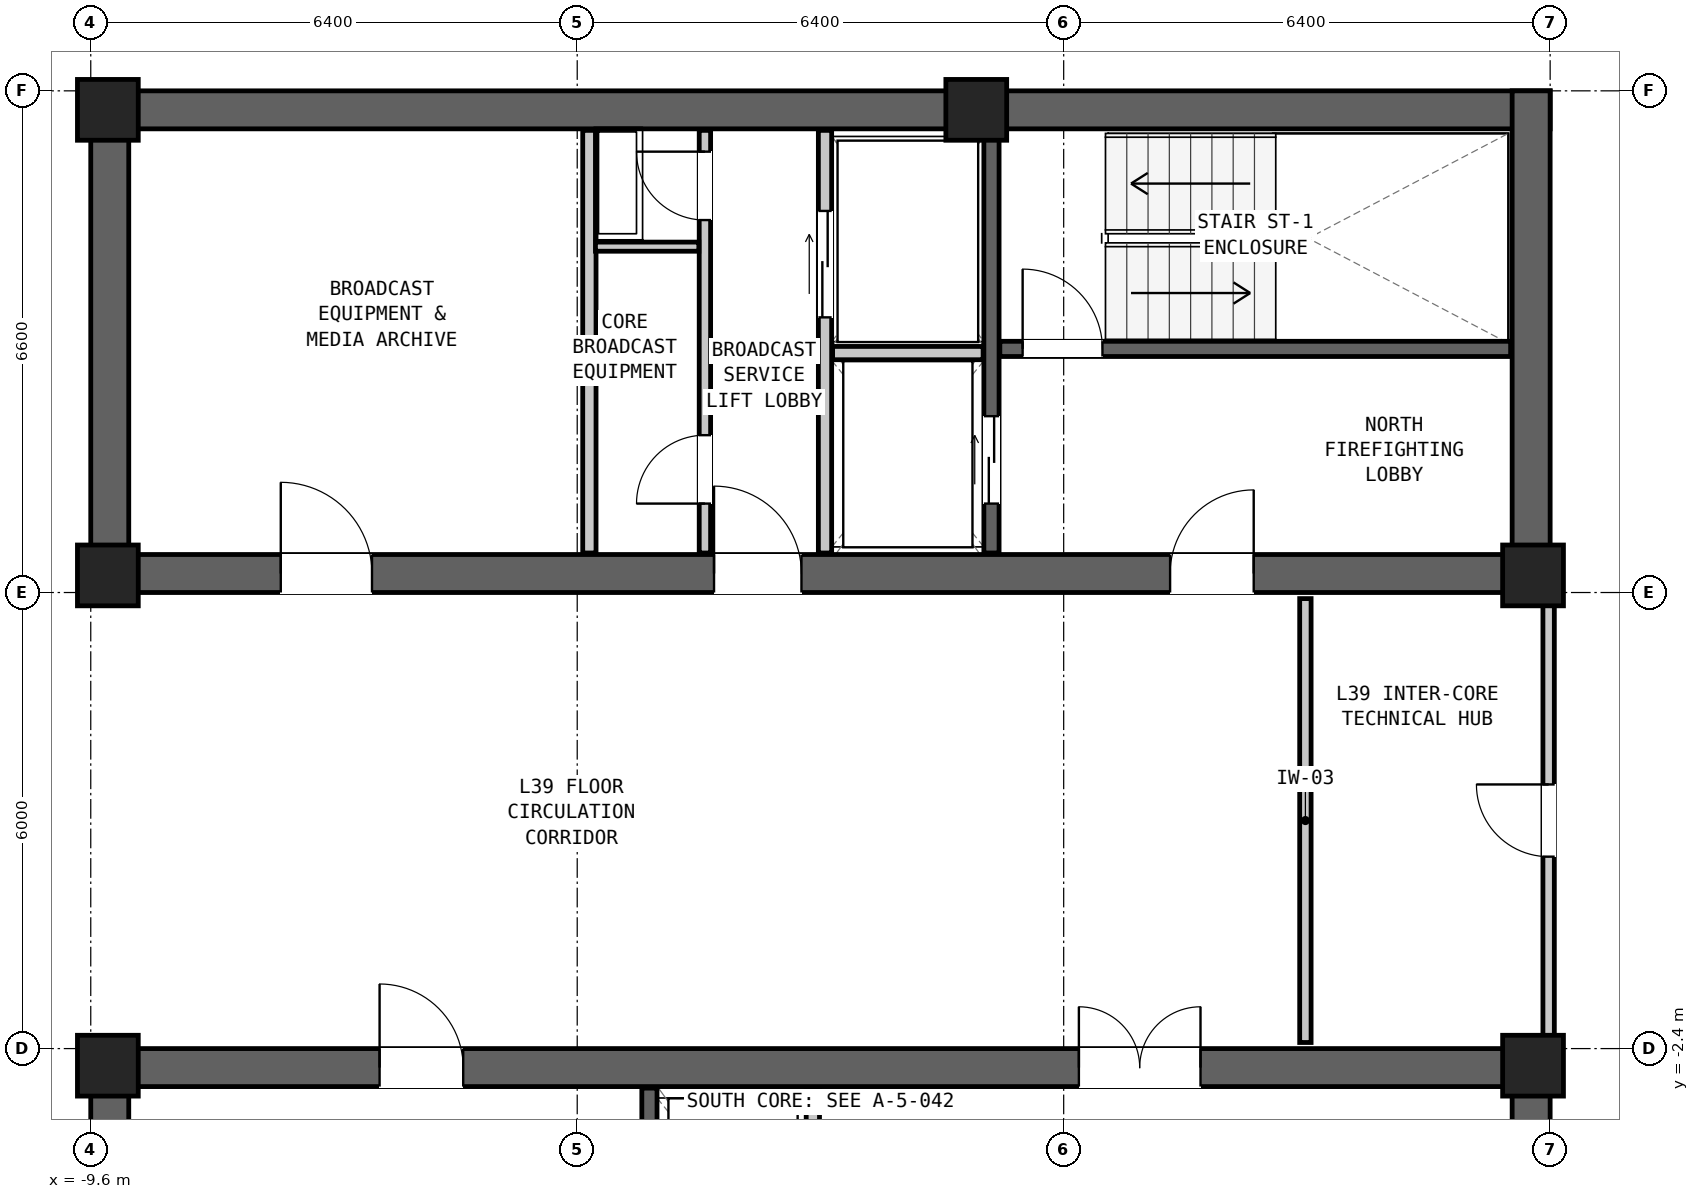
"""IFC4 building model, lengths in metres.
Left out: names, types, materials, properties, quantities, classifications, styles, units other than length and angle.
Written with IfcOpenShell. Run it as: python <this file> out.ifc"""

import sys

from ifc_helpers import new_model, si_unit, direction, frame, frame_2d, origin, origin_2d, place, context, subcontext, project, spatial, rectangle, extrude, element, fill, save


model = new_model("IFC4")
c1 = context("Model", 3, precision=1e-05, world=origin(), true_north=direction((0.0, 1.0)))
c2 = subcontext(c1, "Body", "Model", "MODEL_VIEW")
j1 = project(units=[si_unit("LENGTHUNIT", "METRE"), si_unit("PLANEANGLEUNIT", "RADIAN")], contexts=[c1])
p1 = place(None, origin())
s1 = spatial("IfcSite", under=j1, at=p1, CompositionType="ELEMENT")
p2 = place(p1, origin())
s2 = spatial("IfcBuilding", under=s1, at=p2, CompositionType="ELEMENT")
p3 = place(p2, frame((0.0, 0.0, 134.15)))
s3 = spatial("IfcBuildingStorey", under=s2, at=p3, CompositionType="ELEMENT", Elevation=134.15)
p4 = place(p3, frame((-9.6, 9.95, 0.0), z_axis=(0.0, 0.0, 1.0), x_axis=(1.0, 0.0, 0.0)))
e1 = element("IfcWall", 1, at=p4, inside=s3, PredefinedType="SHEAR", context=c2, shape_type="SweptSolid", body=[
    extrude(rectangle(XDim=19.2, YDim=0.5, at=frame_2d((9.6, 0.0))), origin(), (0.0, 0.0, 1.0), 3.05),
])
p5 = place(p3, frame((-9.6, 3.85, 0.0), z_axis=(0.0, 0.0, 1.0), x_axis=(1.0, 0.0, 0.0)))
e2 = element("IfcWall", 2, at=p5, inside=s3, PredefinedType="SHEAR", context=c2, shape_type="SweptSolid", body=[
    extrude(rectangle(XDim=19.2, YDim=0.5, at=frame_2d((9.6, 0.0))), origin(), (0.0, 0.0, 1.0), 3.05),
])
p6 = place(p5, frame((14.2, 0.0, 0.0)))
e3 = element("IfcOpeningElement", 3, at=p6, cuts=e2, PredefinedType="OPENING", context=c2, shape_type="SweptSolid", body=[
    extrude(rectangle(XDim=1.1, YDim=2.08, at=frame_2d((0.55, 1.04))), frame((0.0, 0.262, 0.0), z_axis=(0.0, -1.0, 0.0), x_axis=(1.0, 0.0, 0.0)), (0.0, 0.0, 1.0), 0.524),
])
p7 = place(p5, frame((8.2, 0.0, 0.0)))
e4 = element("IfcOpeningElement", 4, at=p7, cuts=e2, PredefinedType="OPENING", context=c2, shape_type="SweptSolid", body=[
    extrude(rectangle(XDim=1.15, YDim=2.1, at=frame_2d((0.575, 1.05))), frame((0.0, 0.262, 0.0), z_axis=(0.0, -1.0, 0.0), x_axis=(1.0, 0.0, 0.0)), (0.0, 0.0, 1.0), 0.524),
])
p8 = place(p5, frame((2.5, 0.0, 0.0)))
e5 = element("IfcOpeningElement", 5, at=p8, cuts=e2, PredefinedType="OPENING", context=c2, shape_type="SweptSolid", body=[
    extrude(rectangle(XDim=1.2, YDim=2.1, at=frame_2d((0.6, 1.05))), frame((0.0, 0.262, 0.0), z_axis=(0.0, -1.0, 0.0), x_axis=(1.0, 0.0, 0.0)), (0.0, 0.0, 1.0), 0.524),
])
for number, where, z_axis, x_axis in (
    (6, (-9.35, 3.6, 0.0), (0.0, 0.0, 1.0), (0.0, 1.0, 0.0)),
    (7, (9.35, 3.6, 0.0), (0.0, 0.0, 1.0), (0.0, 1.0, 0.0)),
):
    element("IfcWall", number, at=place(p3, frame(where, z_axis=z_axis, x_axis=x_axis)), inside=s3, PredefinedType="SHEAR", context=c2, shape_type="SweptSolid", body=[
        extrude(rectangle(XDim=6.6, YDim=0.5, at=frame_2d((3.3, 0.0))), origin(), (0.0, 0.0, 1.0), 3.05),
    ])
p9 = place(p3, frame((-9.6, -2.65, 0.0), z_axis=(0.0, 0.0, 1.0), x_axis=(1.0, 0.0, 0.0)))
e8 = element("IfcWall", 8, at=p9, inside=s3, PredefinedType="SHEAR", context=c2, shape_type="SweptSolid", body=[
    extrude(rectangle(XDim=19.2, YDim=0.5, at=frame_2d((9.6, 0.0))), origin(), (0.0, 0.0, 1.0), 3.05),
])
p10 = place(p9, frame((3.8, 0.0, 0.0)))
e9 = element("IfcOpeningElement", 9, at=p10, cuts=e8, PredefinedType="OPENING", context=c2, shape_type="SweptSolid", body=[
    extrude(rectangle(XDim=1.1, YDim=2.08, at=frame_2d((0.55, 1.04))), frame((0.0, 0.262, 0.0), z_axis=(0.0, -1.0, 0.0), x_axis=(1.0, 0.0, 0.0)), (0.0, 0.0, 1.0), 0.524),
])
p11 = place(p9, frame((13.0, 0.0, 0.0)))
e10 = element("IfcOpeningElement", 10, at=p11, cuts=e8, PredefinedType="OPENING", context=c2, shape_type="SweptSolid", body=[
    extrude(rectangle(XDim=1.6, YDim=2.12, at=frame_2d((0.8, 1.06))), frame((0.0, 0.262, 0.0), z_axis=(0.0, -1.0, 0.0), x_axis=(1.0, 0.0, 0.0)), (0.0, 0.0, 1.0), 0.524),
])
for number, where, z_axis, x_axis in (
    (11, (-9.35, -9.0, 0.0), (0.0, 0.0, 1.0), (0.0, 1.0, 0.0)),
    (12, (9.35, -9.0, 0.0), (0.0, 0.0, 1.0), (0.0, 1.0, 0.0)),
):
    element("IfcWall", number, at=place(p3, frame(where, z_axis=z_axis, x_axis=x_axis)), inside=s3, PredefinedType="SHEAR", context=c2, shape_type="SweptSolid", body=[
        extrude(rectangle(XDim=6.6, YDim=0.5, at=frame_2d((3.3, 0.0))), origin(), (0.0, 0.0, 1.0), 3.05),
    ])
for number, where, z_axis, x_axis in (
    (13, (-9.375, 9.95, 0.0), (0.0, 0.0, 1.0), (1.0, 0.0, 0.0)),
    (14, (2.05, 9.95, 0.0), (0.0, 0.0, 1.0), (1.0, 0.0, 0.0)),
    (15, (-9.375, 3.825, 0.0), (0.0, 0.0, 1.0), (1.0, 0.0, 0.0)),
    (16, (9.375, 3.825, 0.0), (0.0, 0.0, 1.0), (1.0, 0.0, 0.0)),
    (17, (-9.375, -2.625, 0.0), (0.0, 0.0, 1.0), (1.0, 0.0, 0.0)),
    (18, (9.375, -2.625, 0.0), (0.0, 0.0, 1.0), (1.0, 0.0, 0.0)),
):
    element("IfcColumn", number, at=place(p3, frame(where, z_axis=z_axis, x_axis=x_axis)), inside=s3, PredefinedType="COLUMN", context=c2, shape_type="SweptSolid", body=[
        extrude(rectangle(XDim=0.8, YDim=0.8, at=origin_2d()), origin(), (0.0, 0.0, 1.0), 3.05),
    ])
p12 = place(p3, frame((2.36, 6.805, 0.0), z_axis=(0.0, 0.0, 1.0), x_axis=(1.0, 0.0, 0.0)))
e19 = element("IfcWall", 19, at=p12, inside=s3, PredefinedType="SHEAR", context=c2, shape_type="SweptSolid", body=[
    extrude(rectangle(XDim=6.72, YDim=0.2, at=frame_2d((3.36, 0.0))), origin(), (0.0, 0.0, 1.0), 2.83),
])
p13 = place(p12, frame((0.3, 0.0, 0.0)))
e20 = element("IfcOpeningElement", 20, at=p13, cuts=e19, PredefinedType="OPENING", context=c2, shape_type="SweptSolid", body=[
    extrude(rectangle(XDim=1.05, YDim=2.08, at=frame_2d((0.525, 1.04))), frame((0.0, 0.112, 0.0), z_axis=(0.0, -1.0, 0.0), x_axis=(1.0, 0.0, 0.0)), (0.0, 0.0, 1.0), 0.224),
])
p14 = place(p3, frame((2.25, 4.12, 0.0), z_axis=(0.0, 0.0, 1.0), x_axis=(0.0, 1.0, 0.0)))
e21 = element("IfcWall", 21, at=p14, inside=s3, PredefinedType="SHEAR", context=c2, shape_type="SweptSolid", body=[
    extrude(rectangle(XDim=5.56, YDim=0.2, at=frame_2d((2.78, 0.0))), origin(), (0.0, 0.0, 1.0), 2.83),
])
p15 = place(p14, frame((0.65, 0.0, 0.0)))
e22 = element("IfcOpeningElement", 22, at=p15, cuts=e21, PredefinedType="OPENING", context=c2, shape_type="SweptSolid", body=[
    extrude(rectangle(XDim=1.15, YDim=2.08, at=frame_2d((0.575, 1.04))), frame((0.0, 0.112, 0.0), z_axis=(0.0, -1.0, 0.0), x_axis=(1.0, 0.0, 0.0)), (0.0, 0.0, 1.0), 0.224),
])
p16 = place(p3, frame((0.06, 4.12, 0.0), z_axis=(0.0, 0.0, 1.0), x_axis=(0.0, 1.0, 0.0)))
e23 = element("IfcWall", 23, at=p16, inside=s3, PredefinedType="PARTITIONING", context=c2, shape_type="SweptSolid", body=[
    extrude(rectangle(XDim=5.56, YDim=0.175, at=frame_2d((2.78, 0.0))), origin(), (0.0, 0.0, 1.0), 2.83),
])
p17 = place(p16, frame((3.1, 0.0, 0.0)))
e24 = element("IfcOpeningElement", 24, at=p17, cuts=e23, PredefinedType="OPENING", context=c2, shape_type="SweptSolid", body=[
    extrude(rectangle(XDim=1.4, YDim=2.12, at=frame_2d((0.7, 1.06))), frame((0.0, 0.1, 0.0), z_axis=(0.0, -1.0, 0.0), x_axis=(1.0, 0.0, 0.0)), (0.0, 0.0, 1.0), 0.199),
])
p18 = place(p3, frame((0.16, 6.75, 0.0), z_axis=(0.0, 0.0, 1.0), x_axis=(1.0, 0.0, 0.0)))
e25 = element("IfcWall", 25, at=p18, inside=s3, PredefinedType="PARTITIONING", context=c2, shape_type="SweptSolid", body=[
    extrude(rectangle(XDim=1.98, YDim=0.175, at=frame_2d((0.99, 0.0))), origin(), (0.0, 0.0, 1.0), 2.83),
])
p19 = place(p3, frame((-3.04, 4.12, 0.0), z_axis=(0.0, 0.0, 1.0), x_axis=(0.0, 1.0, 0.0)))
e26 = element("IfcWall", 26, at=p19, inside=s3, PredefinedType="PARTITIONING", context=c2, shape_type="SweptSolid", body=[
    extrude(rectangle(XDim=5.56, YDim=0.175, at=frame_2d((2.78, 0.0))), origin(), (0.0, 0.0, 1.0), 2.83),
])
p20 = place(p3, frame((-1.52, 4.12, 0.0), z_axis=(0.0, 0.0, 1.0), x_axis=(0.0, 1.0, 0.0)))
e27 = element("IfcWall", 27, at=p20, inside=s3, PredefinedType="PARTITIONING", context=c2, shape_type="SweptSolid", body=[
    extrude(rectangle(XDim=5.56, YDim=0.15, at=frame_2d((2.78, 0.0))), origin(), (0.0, 0.0, 1.0), 2.83),
])
p21 = place(p20, frame((4.38, 0.0, 0.0)))
e28 = element("IfcOpeningElement", 28, at=p21, cuts=e27, PredefinedType="OPENING", context=c2, shape_type="SweptSolid", body=[
    extrude(rectangle(XDim=0.9, YDim=2.05, at=frame_2d((0.45, 1.025))), frame((0.0, 0.087, 0.0), z_axis=(0.0, -1.0, 0.0), x_axis=(1.0, 0.0, 0.0)), (0.0, 0.0, 1.0), 0.174),
])
p22 = place(p20, frame((0.65, 0.0, 0.0)))
e29 = element("IfcOpeningElement", 29, at=p22, cuts=e27, PredefinedType="OPENING", context=c2, shape_type="SweptSolid", body=[
    extrude(rectangle(XDim=0.9, YDim=2.05, at=frame_2d((0.45, 1.025))), frame((0.0, 0.087, 0.0), z_axis=(0.0, -1.0, 0.0), x_axis=(1.0, 0.0, 0.0)), (0.0, 0.0, 1.0), 0.174),
])
p23 = place(p3, frame((-2.96, 8.15, 0.0), z_axis=(0.0, 0.0, 1.0), x_axis=(1.0, 0.0, 0.0)))
e30 = element("IfcWall", 30, at=p23, inside=s3, PredefinedType="PARTITIONING", context=c2, shape_type="SweptSolid", body=[
    extrude(rectangle(XDim=1.36, YDim=0.12, at=frame_2d((0.68, 0.0))), origin(), (0.0, 0.0, 1.0), 2.83),
])
p24 = place(p3, frame((-2.25, -8.48, 0.0), z_axis=(0.0, 0.0, 1.0), x_axis=(0.0, 1.0, 0.0)))
e31 = element("IfcWall", 31, at=p24, inside=s3, PredefinedType="SHEAR", context=c2, shape_type="SweptSolid", body=[
    extrude(rectangle(XDim=5.56, YDim=0.2, at=frame_2d((2.78, 0.0))), origin(), (0.0, 0.0, 1.0), 2.83),
])
p25 = place(p24, frame((3.35, 0.0, 0.0)))
e32 = element("IfcOpeningElement", 32, at=p25, cuts=e31, PredefinedType="OPENING", context=c2, shape_type="SweptSolid", body=[
    extrude(rectangle(XDim=1.15, YDim=2.08, at=frame_2d((0.575, 1.04))), frame((0.0, 0.112, 0.0), z_axis=(0.0, -1.0, 0.0), x_axis=(1.0, 0.0, 0.0)), (0.0, 0.0, 1.0), 0.224),
])
p26 = place(p3, frame((-0.1, -8.48, 0.0), z_axis=(0.0, 0.0, 1.0), x_axis=(0.0, 1.0, 0.0)))
e33 = element("IfcWall", 33, at=p26, inside=s3, PredefinedType="PARTITIONING", context=c2, shape_type="SweptSolid", body=[
    extrude(rectangle(XDim=5.56, YDim=0.175, at=frame_2d((2.78, 0.0))), origin(), (0.0, 0.0, 1.0), 2.83),
])
p27 = place(p26, frame((0.45, 0.0, 0.0)))
e34 = element("IfcOpeningElement", 34, at=p27, cuts=e33, PredefinedType="OPENING", context=c2, shape_type="SweptSolid", body=[
    extrude(rectangle(XDim=0.9, YDim=2.05, at=frame_2d((0.45, 1.025))), frame((0.0, 0.1, 0.0), z_axis=(0.0, -1.0, 0.0), x_axis=(1.0, 0.0, 0.0)), (0.0, 0.0, 1.0), 0.199),
])
p28 = place(p3, frame((6.38, -2.32, 0.0), z_axis=(0.0, 0.0, 1.0), x_axis=(0.0, 1.0, 0.0)))
e35 = element("IfcWall", 35, at=p28, inside=s3, PredefinedType="PARTITIONING", context=c2, shape_type="SweptSolid", body=[
    extrude(rectangle(XDim=5.84, YDim=0.15, at=frame_2d((2.92, 0.0))), origin(), (0.0, 0.0, 1.0), 2.198),
])
p29 = place(p3, frame((9.58, -2.32, 0.0), z_axis=(0.0, 0.0, 1.0), x_axis=(0.0, 1.0, 0.0)))
e36 = element("IfcWall", 36, at=p29, inside=s3, PredefinedType="PARTITIONING", context=c2, shape_type="SweptSolid", body=[
    extrude(rectangle(XDim=5.84, YDim=0.15, at=frame_2d((2.92, 0.0))), origin(), (0.0, 0.0, 1.0), 2.198),
])
p30 = place(p29, frame((2.445, 0.0, 0.0)))
e37 = element("IfcOpeningElement", 37, at=p30, cuts=e36, PredefinedType="OPENING", context=c2, shape_type="SweptSolid", body=[
    extrude(rectangle(XDim=0.95, YDim=2.1, at=frame_2d((0.475, 1.05))), frame((0.0, 0.087, 0.0), z_axis=(0.0, -1.0, 0.0), x_axis=(1.0, 0.0, 0.0)), (0.0, 0.0, 1.0), 0.174),
])
p31 = place(p13, origin())
e38 = element("IfcDoor", 38, at=p31, inside=s3, OperationType="SINGLE_SWING_LEFT", PredefinedType="DOOR", context=c2, shape_type="SweptSolid", body=[
    extrude(rectangle(XDim=1.05, YDim=2.08, at=frame_2d((0.525, 1.04))), frame((0.0, 0.025, 0.0), z_axis=(0.0, -1.0, 0.0), x_axis=(1.0, 0.0, 0.0)), (0.0, 0.0, 1.0), 0.05),
])
fill(e20, e38)
p32 = place(p6, origin())
e39 = element("IfcDoor", 39, at=p32, inside=s3, OperationType="SINGLE_SWING_RIGHT", PredefinedType="DOOR", context=c2, shape_type="SweptSolid", body=[
    extrude(rectangle(XDim=1.1, YDim=2.08, at=frame_2d((0.55, 1.04))), frame((0.0, 0.025, 0.0), z_axis=(0.0, -1.0, 0.0), x_axis=(1.0, 0.0, 0.0)), (0.0, 0.0, 1.0), 0.05),
])
fill(e3, e39)
p33 = place(p15, origin())
e40 = element("IfcDoor", 40, at=p33, inside=s3, OperationType="DOUBLE_DOOR_SLIDING", PredefinedType="DOOR", context=c2, shape_type="SweptSolid", body=[
    extrude(rectangle(XDim=1.15, YDim=2.08, at=frame_2d((0.575, 1.04))), frame((0.0, 0.025, 0.0), z_axis=(0.0, -1.0, 0.0), x_axis=(1.0, 0.0, 0.0)), (0.0, 0.0, 1.0), 0.05),
])
fill(e22, e40)
p34 = place(p17, origin())
e41 = element("IfcDoor", 41, at=p34, inside=s3, OperationType="DOUBLE_DOOR_SLIDING", PredefinedType="DOOR", context=c2, shape_type="SweptSolid", body=[
    extrude(rectangle(XDim=1.4, YDim=2.12, at=frame_2d((0.7, 1.06))), frame((0.0, 0.025, 0.0), z_axis=(0.0, -1.0, 0.0), x_axis=(1.0, 0.0, 0.0)), (0.0, 0.0, 1.0), 0.05),
])
fill(e24, e41)
p35 = place(p7, origin())
e42 = element("IfcDoor", 42, at=p35, inside=s3, OperationType="SINGLE_SWING_LEFT", PredefinedType="DOOR", context=c2, shape_type="SweptSolid", body=[
    extrude(rectangle(XDim=1.15, YDim=2.1, at=frame_2d((0.575, 1.05))), frame((0.0, 0.025, 0.0), z_axis=(0.0, -1.0, 0.0), x_axis=(1.0, 0.0, 0.0)), (0.0, 0.0, 1.0), 0.05),
])
fill(e4, e42)
p36 = place(p21, origin())
e43 = element("IfcDoor", 43, at=p36, inside=s3, OperationType="SINGLE_SWING_RIGHT", PredefinedType="DOOR", context=c2, shape_type="SweptSolid", body=[
    extrude(rectangle(XDim=0.9, YDim=2.05, at=frame_2d((0.45, 1.025))), frame((0.0, 0.025, 0.0), z_axis=(0.0, -1.0, 0.0), x_axis=(1.0, 0.0, 0.0)), (0.0, 0.0, 1.0), 0.05),
])
fill(e28, e43)
p37 = place(p22, origin())
e44 = element("IfcDoor", 44, at=p37, inside=s3, OperationType="SINGLE_SWING_LEFT", PredefinedType="DOOR", context=c2, shape_type="SweptSolid", body=[
    extrude(rectangle(XDim=0.9, YDim=2.05, at=frame_2d((0.45, 1.025))), frame((0.0, 0.025, 0.0), z_axis=(0.0, -1.0, 0.0), x_axis=(1.0, 0.0, 0.0)), (0.0, 0.0, 1.0), 0.05),
])
fill(e29, e44)
p38 = place(p8, origin())
e45 = element("IfcDoor", 45, at=p38, inside=s3, OperationType="SINGLE_SWING_LEFT", PredefinedType="DOOR", context=c2, shape_type="SweptSolid", body=[
    extrude(rectangle(XDim=1.2, YDim=2.1, at=frame_2d((0.6, 1.05))), frame((0.0, 0.025, 0.0), z_axis=(0.0, -1.0, 0.0), x_axis=(1.0, 0.0, 0.0)), (0.0, 0.0, 1.0), 0.05),
])
fill(e5, e45)
p39 = place(p10, origin())
e46 = element("IfcDoor", 46, at=p39, inside=s3, OperationType="SINGLE_SWING_LEFT", PredefinedType="DOOR", context=c2, shape_type="SweptSolid", body=[
    extrude(rectangle(XDim=1.1, YDim=2.08, at=frame_2d((0.55, 1.04))), frame((0.0, 0.025, 0.0), z_axis=(0.0, -1.0, 0.0), x_axis=(1.0, 0.0, 0.0)), (0.0, 0.0, 1.0), 0.05),
])
fill(e9, e46)
p40 = place(p11, origin())
e47 = element("IfcDoor", 47, at=p40, inside=s3, OperationType="DOUBLE_DOOR_SINGLE_SWING", PredefinedType="DOOR", context=c2, shape_type="SweptSolid", body=[
    extrude(rectangle(XDim=1.6, YDim=2.12, at=frame_2d((0.8, 1.06))), frame((0.0, 0.025, 0.0), z_axis=(0.0, -1.0, 0.0), x_axis=(1.0, 0.0, 0.0)), (0.0, 0.0, 1.0), 0.05),
])
fill(e10, e47)
p41 = place(p30, origin())
e48 = element("IfcDoor", 48, at=p41, inside=s3, OperationType="SINGLE_SWING_RIGHT", PredefinedType="DOOR", context=c2, shape_type="SweptSolid", body=[
    extrude(rectangle(XDim=0.95, YDim=2.1, at=frame_2d((0.475, 1.05))), frame((0.0, 0.025, 0.0), z_axis=(0.0, -1.0, 0.0), x_axis=(1.0, 0.0, 0.0)), (0.0, 0.0, 1.0), 0.05),
])
fill(e37, e48)
save(model, sys.argv[1])
